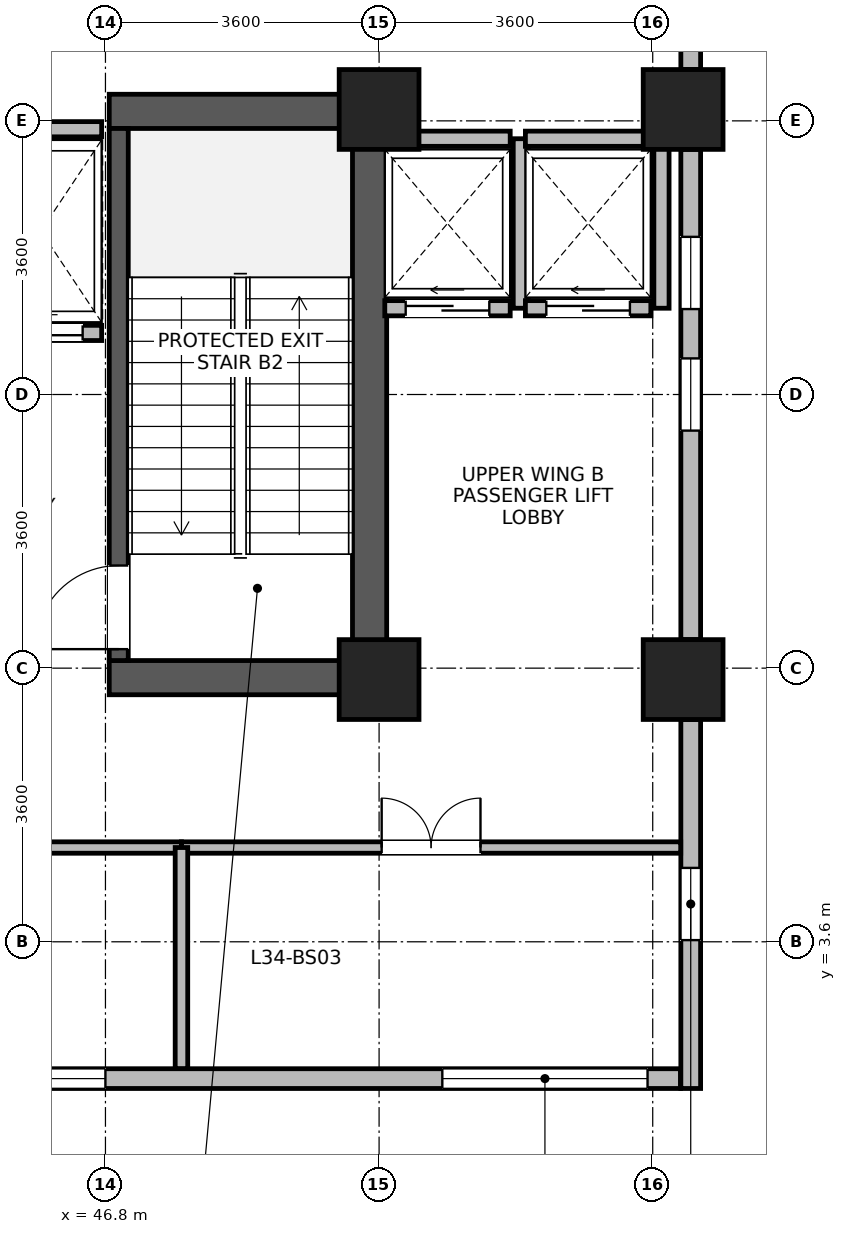
"""IFC4 building model, lengths in metres.
Left out: names, types, materials, properties, quantities, classifications, styles, units other than length and angle.
Written with IfcOpenShell. Run it as: python <this file> out.ifc"""

import sys

from ifc_helpers import new_model, si_unit, direction, frame, frame_2d, origin, origin_2d, place, context, subcontext, project, spatial, rectangle, extrude, source, transform, mapped, element, fill, save


model = new_model("IFC4")
c1 = context("Model", 3, precision=1e-05, world=origin(), true_north=direction((0.0, 1.0)))
c2 = subcontext(c1, "Body", "Model", "MODEL_VIEW")
j1 = project(units=[si_unit("LENGTHUNIT", "METRE"), si_unit("PLANEANGLEUNIT", "RADIAN")], contexts=[c1])
p1 = place(None, origin())
s1 = spatial("IfcSite", under=j1, at=p1, CompositionType="ELEMENT")
p2 = place(p1, origin())
s2 = spatial("IfcBuilding", under=s1, at=p2, CompositionType="ELEMENT")
p3 = place(p2, frame((0.0, 0.0, 135.6)))
s3 = spatial("IfcBuildingStorey", under=s2, at=p3, CompositionType="ELEMENT", Elevation=135.6)
p4 = place(p3, frame((50.275, 6.85, 0.0), z_axis=(0.0, 0.0, 1.0), x_axis=(0.0, 1.0, 0.0)))
e1 = element("IfcWall", 1, at=p4, inside=s3, PredefinedType="SHEAR", context=c2, shape_type="SweptSolid", body=[
    extrude(rectangle(XDim=7.9, YDim=0.45, at=frame_2d((3.95, 0.0))), origin(), (0.0, 0.0, 1.0), 4.36),
])
for number, where, z_axis, x_axis in (
    (2, (46.85, 7.075, 0.0), (0.0, 0.0, 1.0), (1.0, 0.0, 0.0)),
    (3, (46.85, 14.525, 0.0), (0.0, 0.0, 1.0), (1.0, 0.0, 0.0)),
):
    element("IfcWall", number, at=place(p3, frame(where, z_axis=z_axis, x_axis=x_axis)), inside=s3, PredefinedType="SHEAR", context=c2, shape_type="SweptSolid", body=[
        extrude(rectangle(XDim=3.2, YDim=0.45, at=frame_2d((1.6, 0.0))), origin(), (0.0, 0.0, 1.0), 4.36),
    ])
p5 = place(p3, frame((46.975, 7.3, 0.0), z_axis=(0.0, 0.0, 1.0), x_axis=(0.0, 1.0, 0.0)))
e4 = element("IfcWall", 4, at=p5, inside=s3, PredefinedType="SHEAR", context=c2, shape_type="SweptSolid", body=[
    extrude(rectangle(XDim=7.0, YDim=0.25, at=frame_2d((3.5, 0.0))), origin(), (0.0, 0.0, 1.0), 4.36),
])
p6 = place(p5, frame((0.15, 0.0, 0.0)))
e5 = element("IfcOpeningElement", 5, at=p6, cuts=e4, PredefinedType="OPENING", context=c2, shape_type="SweptSolid", body=[
    extrude(rectangle(XDim=1.1, YDim=2.08, at=frame_2d((0.55, 1.04))), frame((0.0, 0.135, 0.0), z_axis=(0.0, -1.0, 0.0), x_axis=(1.0, 0.0, 0.0)), (0.0, 0.0, 1.0), 0.27),
])
m1 = source(origin(), c2, "Body", "SweptSolid", [
    extrude(rectangle(XDim=1.05, YDim=1.05, at=origin_2d()), origin(), (0.0, 0.0, 1.0), 4.6),
])
for number, where, z_axis, x_axis in (
    (6, (50.4, 7.05, 0.0), (0.0, 0.0, 1.0), (1.0, 0.0, 0.0)),
    (7, (50.4, 14.55, 0.0), (0.0, 0.0, 1.0), (1.0, 0.0, 0.0)),
    (8, (54.4, 7.05, 0.0), (0.0, 0.0, 1.0), (1.0, 0.0, 0.0)),
    (9, (54.4, 14.55, 0.0), (0.0, 0.0, 1.0), (1.0, 0.0, 0.0)),
):
    element("IfcColumn", number, at=place(p3, frame(where, z_axis=z_axis, x_axis=x_axis)), inside=s3, PredefinedType="COLUMN", context=c2, shape_type="MappedRepresentation", body=[
        mapped(m1, transform((0.0, 0.0, 0.0), x_axis=(1.0, 0.0, 0.0), y_axis=(0.0, 1.0, 0.0), z_axis=(0.0, 0.0, 1.0), scale=1.0)),
    ])
p7 = place(p3, frame((54.365, 1.8, 0.0), z_axis=(0.0, 0.0, 1.0), x_axis=(-1.0, 0.0, 0.0)))
e10 = element("IfcWall", 10, at=p7, inside=s3, PredefinedType="STANDARD", context=c2, shape_type="SweptSolid", body=[
    extrude(rectangle(XDim=28.53, YDim=0.26, at=frame_2d((14.265, 0.0))), origin(), (0.0, 0.0, 1.0), 4.34),
])
p8 = place(p7, frame((0.433, 0.0, 0.85)))
e11 = element("IfcOpeningElement", 11, at=p8, cuts=e10, PredefinedType="OPENING", context=c2, shape_type="SweptSolid", body=[
    extrude(rectangle(XDim=2.7, YDim=2.05, at=frame_2d((1.35, 1.025))), frame((0.0, 0.14, 0.0), z_axis=(0.0, -1.0, 0.0), x_axis=(1.0, 0.0, 0.0)), (0.0, 0.0, 1.0), 0.28),
])
p9 = place(p7, frame((7.566, 0.0, 0.85)))
e12 = element("IfcOpeningElement", 12, at=p9, cuts=e10, PredefinedType="OPENING", context=c2, shape_type="SweptSolid", body=[
    extrude(rectangle(XDim=2.7, YDim=2.05, at=frame_2d((1.35, 1.025))), frame((0.0, 0.14, 0.0), z_axis=(0.0, -1.0, 0.0), x_axis=(1.0, 0.0, 0.0)), (0.0, 0.0, 1.0), 0.28),
])
p10 = place(p7, frame((11.132, 0.0, 0.85)))
e13 = element("IfcOpeningElement", 13, at=p10, cuts=e10, PredefinedType="OPENING", context=c2, shape_type="SweptSolid", body=[
    extrude(rectangle(XDim=2.7, YDim=2.05, at=frame_2d((1.35, 1.025))), frame((0.0, 0.14, 0.0), z_axis=(0.0, -1.0, 0.0), x_axis=(1.0, 0.0, 0.0)), (0.0, 0.0, 1.0), 0.28),
])
p11 = place(p7, frame((18.264, 0.0, 0.85)))
e14 = element("IfcOpeningElement", 14, at=p11, cuts=e10, PredefinedType="OPENING", context=c2, shape_type="SweptSolid", body=[
    extrude(rectangle(XDim=2.7, YDim=2.05, at=frame_2d((1.35, 1.025))), frame((0.0, 0.14, 0.0), z_axis=(0.0, -1.0, 0.0), x_axis=(1.0, 0.0, 0.0)), (0.0, 0.0, 1.0), 0.28),
])
p12 = place(p7, frame((21.831, 0.0, 0.85)))
e15 = element("IfcOpeningElement", 15, at=p12, cuts=e10, PredefinedType="OPENING", context=c2, shape_type="SweptSolid", body=[
    extrude(rectangle(XDim=2.7, YDim=2.05, at=frame_2d((1.35, 1.025))), frame((0.0, 0.14, 0.0), z_axis=(0.0, -1.0, 0.0), x_axis=(1.0, 0.0, 0.0)), (0.0, 0.0, 1.0), 0.28),
])
p13 = place(p7, frame((25.397, 0.0, 0.85)))
e16 = element("IfcOpeningElement", 16, at=p13, cuts=e10, PredefinedType="OPENING", context=c2, shape_type="SweptSolid", body=[
    extrude(rectangle(XDim=2.7, YDim=2.05, at=frame_2d((1.35, 1.025))), frame((0.0, 0.14, 0.0), z_axis=(0.0, -1.0, 0.0), x_axis=(1.0, 0.0, 0.0)), (0.0, 0.0, 1.0), 0.28),
])
p14 = place(p3, frame((54.5, 6.524, 0.0), z_axis=(0.0, 0.0, 1.0), x_axis=(0.0, -1.0, 0.0)))
e17 = element("IfcWall", 17, at=p14, inside=s3, PredefinedType="STANDARD", context=c2, shape_type="SweptSolid", body=[
    extrude(rectangle(XDim=4.854, YDim=0.26, at=frame_2d((2.427, 0.0))), origin(), (0.0, 0.0, 1.0), 4.34),
])
p15 = place(p14, frame((1.952, 0.0, 0.85)))
e18 = element("IfcOpeningElement", 18, at=p15, cuts=e17, PredefinedType="OPENING", context=c2, shape_type="SweptSolid", body=[
    extrude(rectangle(XDim=0.95, YDim=1.75, at=frame_2d((0.475, 0.875))), frame((0.0, 0.14, 0.0), z_axis=(0.0, -1.0, 0.0), x_axis=(1.0, 0.0, 0.0)), (0.0, 0.0, 1.0), 0.28),
])
p16 = place(p3, frame((54.5, 14.024, 0.0), z_axis=(0.0, 0.0, 1.0), x_axis=(0.0, -1.0, 0.0)))
e19 = element("IfcWall", 19, at=p16, inside=s3, PredefinedType="STANDARD", context=c2, shape_type="SweptSolid", body=[
    extrude(rectangle(XDim=6.448, YDim=0.26, at=frame_2d((3.224, 0.0))), origin(), (0.0, 0.0, 1.0), 3.89),
])
p17 = place(p16, frame((2.749, 0.0, 0.85)))
e20 = element("IfcOpeningElement", 20, at=p17, cuts=e19, PredefinedType="OPENING", context=c2, shape_type="SweptSolid", body=[
    extrude(rectangle(XDim=0.95, YDim=1.75, at=frame_2d((0.475, 0.875))), frame((0.0, 0.14, 0.0), z_axis=(0.0, -1.0, 0.0), x_axis=(1.0, 0.0, 0.0)), (0.0, 0.0, 1.0), 0.28),
])
p18 = place(p16, frame((1.15, 0.0, 0.85)))
e21 = element("IfcOpeningElement", 21, at=p18, cuts=e19, PredefinedType="OPENING", context=c2, shape_type="SweptSolid", body=[
    extrude(rectangle(XDim=0.95, YDim=1.75, at=frame_2d((0.475, 0.875))), frame((0.0, 0.14, 0.0), z_axis=(0.0, -1.0, 0.0), x_axis=(1.0, 0.0, 0.0)), (0.0, 0.0, 1.0), 0.28),
])
p19 = place(p3, frame((54.5, 21.074, 0.0), z_axis=(0.0, 0.0, 1.0), x_axis=(0.0, -1.0, 0.0)))
e22 = element("IfcWall", 22, at=p19, inside=s3, PredefinedType="STANDARD", context=c2, shape_type="SweptSolid", body=[
    extrude(rectangle(XDim=5.998, YDim=0.26, at=frame_2d((2.999, 0.0))), origin(), (0.0, 0.0, 1.0), 3.89),
])
p20 = place(p19, frame((2.524, 0.0, 0.85)))
e23 = element("IfcOpeningElement", 23, at=p20, cuts=e22, PredefinedType="OPENING", context=c2, shape_type="SweptSolid", body=[
    extrude(rectangle(XDim=0.95, YDim=1.75, at=frame_2d((0.475, 0.875))), frame((0.0, 0.14, 0.0), z_axis=(0.0, -1.0, 0.0), x_axis=(1.0, 0.0, 0.0)), (0.0, 0.0, 1.0), 0.28),
])
p21 = place(p19, frame((1.037, 0.0, 0.85)))
e24 = element("IfcOpeningElement", 24, at=p21, cuts=e22, PredefinedType="OPENING", context=c2, shape_type="SweptSolid", body=[
    extrude(rectangle(XDim=0.95, YDim=1.75, at=frame_2d((0.475, 0.875))), frame((0.0, 0.14, 0.0), z_axis=(0.0, -1.0, 0.0), x_axis=(1.0, 0.0, 0.0)), (0.0, 0.0, 1.0), 0.28),
])
p22 = place(p3, frame((50.475, 11.935, 0.0), z_axis=(0.0, 0.0, 1.0), x_axis=(1.0, 0.0, 0.0)))
e25 = element("IfcWall", 25, at=p22, inside=s3, PredefinedType="PARTITIONING", context=c2, shape_type="SweptSolid", body=[
    extrude(rectangle(XDim=1.65, YDim=0.2, at=frame_2d((0.825, 0.0))), origin(), (0.0, 0.0, 1.0), 4.34),
])
p23 = place(p22, frame((0.275, 0.0, 0.0)))
e26 = element("IfcOpeningElement", 26, at=p23, cuts=e25, PredefinedType="OPENING", context=c2, shape_type="SweptSolid", body=[
    extrude(rectangle(XDim=1.1, YDim=2.12, at=frame_2d((0.55, 1.06))), frame((0.0, 0.11, 0.0), z_axis=(0.0, -1.0, 0.0), x_axis=(1.0, 0.0, 0.0)), (0.0, 0.0, 1.0), 0.22),
])
p24 = place(p3, frame((50.475, 14.165, 0.0), z_axis=(0.0, 0.0, 1.0), x_axis=(1.0, 0.0, 0.0)))
e27 = element("IfcWall", 27, at=p24, inside=s3, PredefinedType="PARTITIONING", context=c2, shape_type="SweptSolid", body=[
    extrude(rectangle(XDim=1.65, YDim=0.2, at=frame_2d((0.825, 0.0))), origin(), (0.0, 0.0, 1.0), 4.34),
])
p25 = place(p3, frame((52.265, 11.935, 0.0), z_axis=(0.0, 0.0, 1.0), x_axis=(0.0, 1.0, 0.0)))
e28 = element("IfcWall", 28, at=p25, inside=s3, PredefinedType="PARTITIONING", context=c2, shape_type="SweptSolid", body=[
    extrude(rectangle(XDim=2.23, YDim=0.2, at=frame_2d((1.115, 0.0))), origin(), (0.0, 0.0, 1.0), 4.34),
])
p26 = place(p3, frame((52.325, 11.935, 0.0), z_axis=(0.0, 0.0, 1.0), x_axis=(1.0, 0.0, 0.0)))
e29 = element("IfcWall", 29, at=p26, inside=s3, PredefinedType="PARTITIONING", context=c2, shape_type="SweptSolid", body=[
    extrude(rectangle(XDim=1.65, YDim=0.2, at=frame_2d((0.825, 0.0))), origin(), (0.0, 0.0, 1.0), 4.34),
])
p27 = place(p26, frame((0.275, 0.0, 0.0)))
e30 = element("IfcOpeningElement", 30, at=p27, cuts=e29, PredefinedType="OPENING", context=c2, shape_type="SweptSolid", body=[
    extrude(rectangle(XDim=1.1, YDim=2.12, at=frame_2d((0.55, 1.06))), frame((0.0, 0.11, 0.0), z_axis=(0.0, -1.0, 0.0), x_axis=(1.0, 0.0, 0.0)), (0.0, 0.0, 1.0), 0.22),
])
p28 = place(p3, frame((52.325, 14.165, 0.0), z_axis=(0.0, 0.0, 1.0), x_axis=(1.0, 0.0, 0.0)))
e31 = element("IfcWall", 31, at=p28, inside=s3, PredefinedType="PARTITIONING", context=c2, shape_type="SweptSolid", body=[
    extrude(rectangle(XDim=1.65, YDim=0.2, at=frame_2d((0.825, 0.0))), origin(), (0.0, 0.0, 1.0), 4.34),
])
p29 = place(p3, frame((54.115, 11.935, 0.0), z_axis=(0.0, 0.0, 1.0), x_axis=(0.0, 1.0, 0.0)))
e32 = element("IfcWall", 32, at=p29, inside=s3, PredefinedType="PARTITIONING", context=c2, shape_type="SweptSolid", body=[
    extrude(rectangle(XDim=2.23, YDim=0.2, at=frame_2d((1.115, 0.0))), origin(), (0.0, 0.0, 1.0), 3.89),
])
p30 = place(p3, frame((45.15, 11.61, 0.0), z_axis=(0.0, 0.0, 1.0), x_axis=(1.0, 0.0, 0.0)))
e33 = element("IfcWall", 33, at=p30, inside=s3, PredefinedType="PARTITIONING", context=c2, shape_type="SweptSolid", body=[
    extrude(rectangle(XDim=1.6, YDim=0.2, at=frame_2d((0.8, 0.0))), origin(), (0.0, 0.0, 1.0), 4.34),
])
p31 = place(p30, frame((0.25, 0.0, 0.0)))
e34 = element("IfcOpeningElement", 34, at=p31, cuts=e33, PredefinedType="OPENING", context=c2, shape_type="SweptSolid", body=[
    extrude(rectangle(XDim=1.1, YDim=2.12, at=frame_2d((0.55, 1.06))), frame((0.0, 0.11, 0.0), z_axis=(0.0, -1.0, 0.0), x_axis=(1.0, 0.0, 0.0)), (0.0, 0.0, 1.0), 0.22),
])
p32 = place(p3, frame((45.15, 14.29, 0.0), z_axis=(0.0, 0.0, 1.0), x_axis=(1.0, 0.0, 0.0)))
e35 = element("IfcWall", 35, at=p32, inside=s3, PredefinedType="PARTITIONING", context=c2, shape_type="SweptSolid", body=[
    extrude(rectangle(XDim=1.6, YDim=0.2, at=frame_2d((0.8, 0.0))), origin(), (0.0, 0.0, 1.0), 3.34),
])
p33 = place(p3, frame((37.26, 4.84, 0.0), z_axis=(0.0, 0.0, 1.0), x_axis=(1.0, 0.0, 0.0)))
e36 = element("IfcWall", 36, at=p33, inside=s3, PredefinedType="PARTITIONING", context=c2, shape_type="SweptSolid", body=[
    extrude(rectangle(XDim=10.54, YDim=0.15, at=frame_2d((5.27, 0.0))), origin(), (0.0, 0.0, 1.0), 4.34),
])
p34 = place(p33, frame((4.82, 0.0, 0.0)))
e37 = element("IfcOpeningElement", 37, at=p34, cuts=e36, PredefinedType="OPENING", context=c2, shape_type="SweptSolid", body=[
    extrude(rectangle(XDim=0.9, YDim=2.08, at=frame_2d((0.45, 1.04))), frame((0.0, 0.085, 0.0), z_axis=(0.0, -1.0, 0.0), x_axis=(1.0, 0.0, 0.0)), (0.0, 0.0, 1.0), 0.17),
])
p35 = place(p3, frame((47.8, 4.84, 0.0), z_axis=(0.0, 0.0, 1.0), x_axis=(1.0, 0.0, 0.0)))
e38 = element("IfcWall", 38, at=p35, inside=s3, PredefinedType="PARTITIONING", context=c2, shape_type="SweptSolid", body=[
    extrude(rectangle(XDim=6.568, YDim=0.15, at=frame_2d((3.284, 0.0))), origin(), (0.0, 0.0, 1.0), 4.34),
])
p36 = place(p35, frame((2.634, 0.0, 0.0)))
e39 = element("IfcOpeningElement", 39, at=p36, cuts=e38, PredefinedType="OPENING", context=c2, shape_type="SweptSolid", body=[
    extrude(rectangle(XDim=1.3, YDim=2.12, at=frame_2d((0.65, 1.06))), frame((0.0, 0.085, 0.0), z_axis=(0.0, -1.0, 0.0), x_axis=(1.0, 0.0, 0.0)), (0.0, 0.0, 1.0), 0.17),
])
p37 = place(p3, frame((47.8, 1.932, 0.0), z_axis=(0.0, 0.0, 1.0), x_axis=(0.0, 1.0, 0.0)))
e40 = element("IfcWall", 40, at=p37, inside=s3, PredefinedType="PARTITIONING", context=c2, shape_type="SweptSolid", body=[
    extrude(rectangle(XDim=2.908, YDim=0.165, at=frame_2d((1.454, 0.0))), origin(), (0.0, 0.0, 1.0), 4.34),
])
p38 = place(p8, origin())
e41 = element("IfcWindow", 41, at=p38, inside=s3, PartitioningType="SINGLE_PANEL", PredefinedType="WINDOW", context=c2, shape_type="SweptSolid", body=[
    extrude(rectangle(XDim=2.7, YDim=2.05, at=frame_2d((1.35, 1.025))), frame((0.0, 0.03, 0.0), z_axis=(0.0, -1.0, 0.0), x_axis=(1.0, 0.0, 0.0)), (0.0, 0.0, 1.0), 0.06),
])
fill(e11, e41)
p39 = place(p9, origin())
e42 = element("IfcWindow", 42, at=p39, inside=s3, PartitioningType="SINGLE_PANEL", PredefinedType="WINDOW", context=c2, shape_type="SweptSolid", body=[
    extrude(rectangle(XDim=2.7, YDim=2.05, at=frame_2d((1.35, 1.025))), frame((0.0, 0.03, 0.0), z_axis=(0.0, -1.0, 0.0), x_axis=(1.0, 0.0, 0.0)), (0.0, 0.0, 1.0), 0.06),
])
fill(e12, e42)
p40 = place(p15, origin())
e43 = element("IfcWindow", 43, at=p40, inside=s3, PartitioningType="SINGLE_PANEL", PredefinedType="WINDOW", context=c2, shape_type="SweptSolid", body=[
    extrude(rectangle(XDim=0.95, YDim=1.75, at=frame_2d((0.475, 0.875))), frame((0.0, 0.03, 0.0), z_axis=(0.0, -1.0, 0.0), x_axis=(1.0, 0.0, 0.0)), (0.0, 0.0, 1.0), 0.06),
])
fill(e18, e43)
p41 = place(p17, origin())
e44 = element("IfcWindow", 44, at=p41, inside=s3, PartitioningType="SINGLE_PANEL", PredefinedType="WINDOW", context=c2, shape_type="SweptSolid", body=[
    extrude(rectangle(XDim=0.95, YDim=1.75, at=frame_2d((0.475, 0.875))), frame((0.0, 0.03, 0.0), z_axis=(0.0, -1.0, 0.0), x_axis=(1.0, 0.0, 0.0)), (0.0, 0.0, 1.0), 0.06),
])
fill(e20, e44)
p42 = place(p18, origin())
e45 = element("IfcWindow", 45, at=p42, inside=s3, PartitioningType="SINGLE_PANEL", PredefinedType="WINDOW", context=c2, shape_type="SweptSolid", body=[
    extrude(rectangle(XDim=0.95, YDim=1.75, at=frame_2d((0.475, 0.875))), frame((0.0, 0.03, 0.0), z_axis=(0.0, -1.0, 0.0), x_axis=(1.0, 0.0, 0.0)), (0.0, 0.0, 1.0), 0.06),
])
fill(e21, e45)
p43 = place(p6, origin())
e46 = element("IfcDoor", 46, at=p43, inside=s3, OperationType="SINGLE_SWING_LEFT", PredefinedType="DOOR", context=c2, shape_type="SweptSolid", body=[
    extrude(rectangle(XDim=1.1, YDim=2.08, at=frame_2d((0.55, 1.04))), frame((0.0, 0.025, 0.0), z_axis=(0.0, -1.0, 0.0), x_axis=(1.0, 0.0, 0.0)), (0.0, 0.0, 1.0), 0.05),
])
fill(e5, e46)
p44 = place(p23, origin())
e47 = element("IfcDoor", 47, at=p44, inside=s3, OperationType="SLIDING_TO_LEFT", PredefinedType="DOOR", context=c2, shape_type="SweptSolid", body=[
    extrude(rectangle(XDim=1.1, YDim=2.12, at=frame_2d((0.55, 1.06))), frame((0.0, 0.025, 0.0), z_axis=(0.0, -1.0, 0.0), x_axis=(1.0, 0.0, 0.0)), (0.0, 0.0, 1.0), 0.05),
])
fill(e26, e47)
p45 = place(p27, origin())
e48 = element("IfcDoor", 48, at=p45, inside=s3, OperationType="SLIDING_TO_LEFT", PredefinedType="DOOR", context=c2, shape_type="SweptSolid", body=[
    extrude(rectangle(XDim=1.1, YDim=2.12, at=frame_2d((0.55, 1.06))), frame((0.0, 0.025, 0.0), z_axis=(0.0, -1.0, 0.0), x_axis=(1.0, 0.0, 0.0)), (0.0, 0.0, 1.0), 0.05),
])
fill(e30, e48)
p46 = place(p31, origin())
e49 = element("IfcDoor", 49, at=p46, inside=s3, OperationType="SLIDING_TO_LEFT", PredefinedType="DOOR", context=c2, shape_type="SweptSolid", body=[
    extrude(rectangle(XDim=1.1, YDim=2.12, at=frame_2d((0.55, 1.06))), frame((0.0, 0.025, 0.0), z_axis=(0.0, -1.0, 0.0), x_axis=(1.0, 0.0, 0.0)), (0.0, 0.0, 1.0), 0.05),
])
fill(e34, e49)
p47 = place(p36, origin())
e50 = element("IfcDoor", 50, at=p47, inside=s3, OperationType="DOUBLE_DOOR_SINGLE_SWING", PredefinedType="DOOR", context=c2, shape_type="SweptSolid", body=[
    extrude(rectangle(XDim=1.3, YDim=2.12, at=frame_2d((0.65, 1.06))), frame((0.0, 0.025, 0.0), z_axis=(0.0, -1.0, 0.0), x_axis=(1.0, 0.0, 0.0)), (0.0, 0.0, 1.0), 0.05),
])
fill(e39, e50)
save(model, sys.argv[1])
